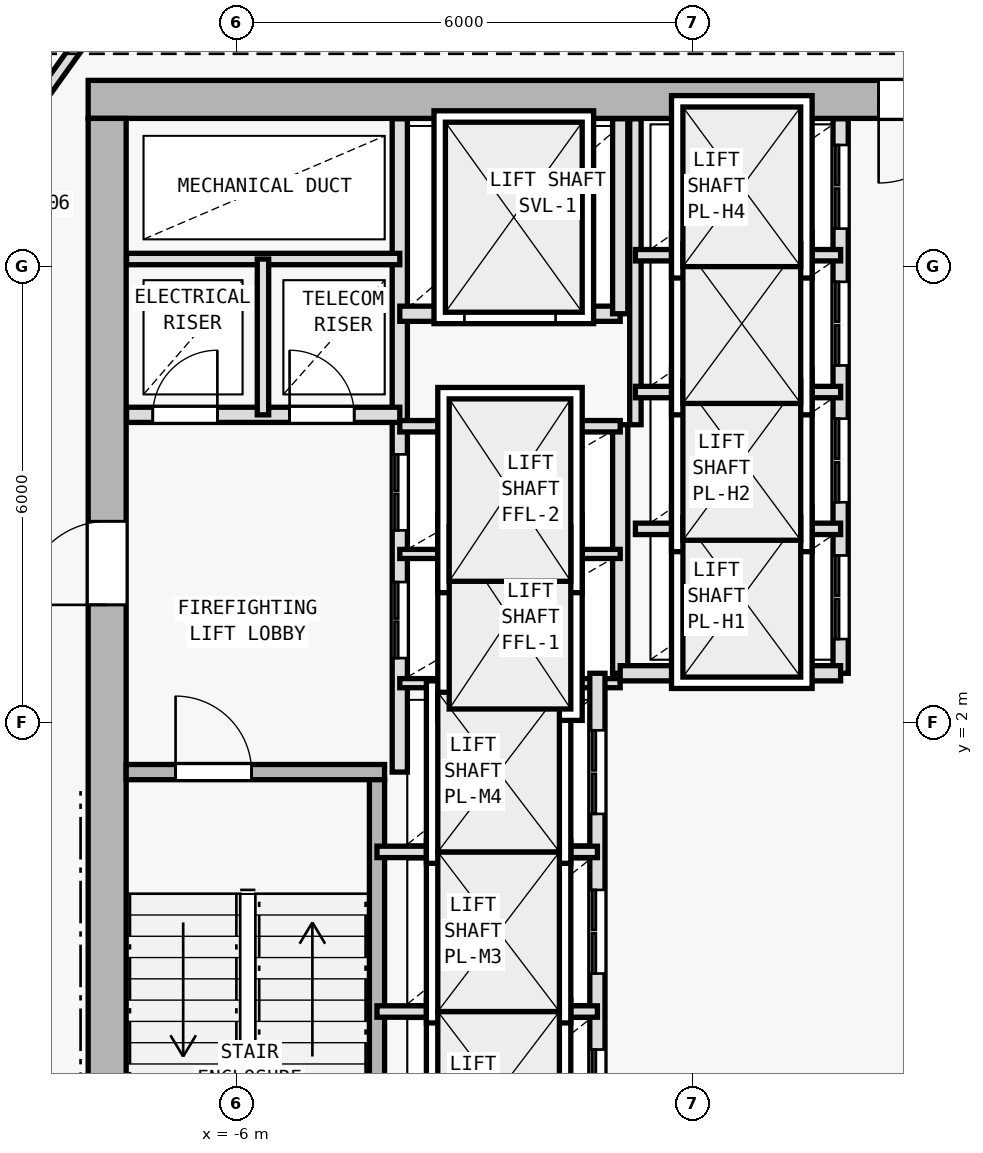
"""IFC4 building model, lengths in metres.
Left out: names, types, materials, properties, quantities, classifications, styles, units other than length and angle.
Written with IfcOpenShell. Run it as: python <this file> out.ifc"""

import sys

from ifc_helpers import new_model, si_unit, direction, frame, frame_2d, origin, origin_2d, place, context, subcontext, project, spatial, rectangle, i_section, extrude, element, fill, save


model = new_model("IFC4")
c1 = context("Model", 3, precision=1e-05, world=origin(), true_north=direction((0.0, 1.0)))
c2 = subcontext(c1, "Body", "Model", "MODEL_VIEW")
j1 = project(units=[si_unit("LENGTHUNIT", "METRE"), si_unit("PLANEANGLEUNIT", "RADIAN")], contexts=[c1])
p1 = place(None, origin())
s1 = spatial("IfcSite", under=j1, at=p1, CompositionType="ELEMENT")
p2 = place(p1, origin())
s2 = spatial("IfcBuilding", under=s1, at=p2, CompositionType="ELEMENT")
p3 = place(p2, frame((0.0, 0.0, 201.9)))
s3 = spatial("IfcBuildingStorey", under=s2, at=p3, CompositionType="ELEMENT", Elevation=201.9)
for number, where, z_axis, x_axis in (
    (1, (-7.7, 10.2, 0.0), (0.0, 0.0, 1.0), (1.0, 0.0, 0.0)),
    (2, (-7.7, 2.0, 0.0), (0.0, 0.0, 1.0), (1.0, 0.0, 0.0)),
):
    element("IfcColumn", number, at=place(p3, frame(where, z_axis=z_axis, x_axis=x_axis)), inside=s3, PredefinedType="COLUMN", context=c2, shape_type="SweptSolid", body=[
        extrude(i_section(OverallWidth=0.398, OverallDepth=0.387, WebThickness=0.013, FlangeThickness=0.022, FilletRadius=0.015, at=origin_2d()), origin(), (0.0, 0.0, 1.0), 3.6),
    ])
p4 = place(p3, frame((7.95, 10.2, 0.0), z_axis=(0.0, 0.0, 1.0), x_axis=(-1.0, 0.0, 0.0)))
e3 = element("IfcWall", 3, at=p4, inside=s3, PredefinedType="SHEAR", context=c2, shape_type="SweptSolid", body=[
    extrude(rectangle(XDim=15.9, YDim=0.5, at=frame_2d((7.95, 0.0))), origin(), (0.0, 0.0, 1.0), 3.35),
])
p5 = place(p4, frame((4.4, 0.0, 0.0)))
e4 = element("IfcOpeningElement", 4, at=p5, cuts=e3, PredefinedType="OPENING", context=c2, shape_type="SweptSolid", body=[
    extrude(rectangle(XDim=1.1, YDim=2.15, at=frame_2d((0.55, 1.075))), frame((0.0, 0.26, 0.0), z_axis=(0.0, -1.0, 0.0), x_axis=(1.0, 0.0, 0.0)), (0.0, 0.0, 1.0), 0.52),
])
p6 = place(p3, frame((-7.7, -9.15, 0.0), z_axis=(0.0, 0.0, 1.0), x_axis=(0.0, 1.0, 0.0)))
e5 = element("IfcWall", 5, at=p6, inside=s3, PredefinedType="SHEAR", context=c2, shape_type="SweptSolid", body=[
    extrude(rectangle(XDim=19.1, YDim=0.5, at=frame_2d((9.55, 0.0))), origin(), (0.0, 0.0, 1.0), 3.35),
])
p7 = place(p6, frame((12.7, 0.0, 0.0)))
e6 = element("IfcOpeningElement", 6, at=p7, cuts=e5, PredefinedType="OPENING", context=c2, shape_type="SweptSolid", body=[
    extrude(rectangle(XDim=1.1, YDim=2.15, at=frame_2d((0.55, 1.075))), frame((0.0, 0.26, 0.0), z_axis=(0.0, -1.0, 0.0), x_axis=(1.0, 0.0, 0.0)), (0.0, 0.0, 1.0), 0.52),
])
p8 = place(p3, frame((-7.45, 1.35, 0.0), z_axis=(0.0, 0.0, 1.0), x_axis=(1.0, 0.0, 0.0)))
e7 = element("IfcWall", 7, at=p8, inside=s3, PredefinedType="SOLIDWALL", context=c2, shape_type="SweptSolid", body=[
    extrude(rectangle(XDim=3.4, YDim=0.2, at=frame_2d((1.7, 0.0))), origin(), (0.0, 0.0, 1.0), 3.35),
])
p9 = place(p8, frame((0.65, 0.0, 0.0)))
e8 = element("IfcOpeningElement", 8, at=p9, cuts=e7, PredefinedType="OPENING", context=c2, shape_type="SweptSolid", body=[
    extrude(rectangle(XDim=1.0, YDim=2.15, at=frame_2d((0.5, 1.075))), frame((0.0, 0.11, 0.0), z_axis=(0.0, -1.0, 0.0), x_axis=(1.0, 0.0, 0.0)), (0.0, 0.0, 1.0), 0.22),
])
p10 = place(p3, frame((-4.15, -5.95, 0.0), z_axis=(0.0, 0.0, 1.0), x_axis=(0.0, 1.0, 0.0)))
e9 = element("IfcWall", 9, at=p10, inside=s3, PredefinedType="SOLIDWALL", context=c2, shape_type="SweptSolid", body=[
    extrude(rectangle(XDim=7.2, YDim=0.2, at=frame_2d((3.6, 0.0))), origin(), (0.0, 0.0, 1.0), 3.35),
])
p11 = place(p3, frame((-3.85, 1.35, 0.0), z_axis=(0.0, 0.0, 1.0), x_axis=(0.0, 1.0, 0.0)))
e10 = element("IfcWall", 10, at=p11, inside=s3, PredefinedType="SOLIDWALL", context=c2, shape_type="SweptSolid", body=[
    extrude(rectangle(XDim=8.595, YDim=0.2, at=frame_2d((4.297, 0.0))), origin(), (0.0, 0.0, 1.0), 3.35),
])
p12 = place(p11, frame((1.5, 0.0, 0.0)))
e11 = element("IfcOpeningElement", 11, at=p12, cuts=e10, PredefinedType="OPENING", context=c2, shape_type="SweptSolid", body=[
    extrude(rectangle(XDim=1.0, YDim=2.15, at=frame_2d((0.5, 1.075))), frame((0.0, 0.11, 0.0), z_axis=(0.0, -1.0, 0.0), x_axis=(1.0, 0.0, 0.0)), (0.0, 0.0, 1.0), 0.22),
])
p13 = place(p11, frame((3.18, 0.0, 0.0)))
e12 = element("IfcOpeningElement", 12, at=p13, cuts=e10, PredefinedType="OPENING", context=c2, shape_type="SweptSolid", body=[
    extrude(rectangle(XDim=1.0, YDim=2.15, at=frame_2d((0.5, 1.075))), frame((0.0, 0.11, 0.0), z_axis=(0.0, -1.0, 0.0), x_axis=(1.0, 0.0, 0.0)), (0.0, 0.0, 1.0), 0.22),
])
p14 = place(p3, frame((-7.445, 6.05, 0.0), z_axis=(0.0, 0.0, 1.0), x_axis=(1.0, 0.0, 0.0)))
e13 = element("IfcWall", 13, at=p14, inside=s3, PredefinedType="SOLIDWALL", context=c2, shape_type="SweptSolid", body=[
    extrude(rectangle(XDim=3.595, YDim=0.2, at=frame_2d((1.797, 0.0))), origin(), (0.0, 0.0, 1.0), 3.35),
])
p15 = place(p14, frame((0.345, 0.0, 0.0)))
e14 = element("IfcOpeningElement", 14, at=p15, cuts=e13, PredefinedType="OPENING", context=c2, shape_type="SweptSolid", body=[
    extrude(rectangle(XDim=0.85, YDim=2.1, at=frame_2d((0.425, 1.05))), frame((0.0, 0.11, 0.0), z_axis=(0.0, -1.0, 0.0), x_axis=(1.0, 0.0, 0.0)), (0.0, 0.0, 1.0), 0.22),
])
p16 = place(p14, frame((2.145, 0.0, 0.0)))
e15 = element("IfcOpeningElement", 15, at=p16, cuts=e13, PredefinedType="OPENING", context=c2, shape_type="SweptSolid", body=[
    extrude(rectangle(XDim=0.85, YDim=2.1, at=frame_2d((0.425, 1.05))), frame((0.0, 0.11, 0.0), z_axis=(0.0, -1.0, 0.0), x_axis=(1.0, 0.0, 0.0)), (0.0, 0.0, 1.0), 0.22),
])
p17 = place(p3, frame((-7.445, 8.1, 0.0), z_axis=(0.0, 0.0, 1.0), x_axis=(1.0, 0.0, 0.0)))
e16 = element("IfcWall", 16, at=p17, inside=s3, PredefinedType="PARTITIONING", context=c2, shape_type="SweptSolid", body=[
    extrude(rectangle(XDim=3.595, YDim=0.15, at=frame_2d((1.797, 0.0))), origin(), (0.0, 0.0, 1.0), 3.35),
])
p18 = place(p3, frame((-5.65, 6.05, 0.0), z_axis=(0.0, 0.0, 1.0), x_axis=(0.0, 1.0, 0.0)))
e17 = element("IfcWall", 17, at=p18, inside=s3, PredefinedType="PARTITIONING", context=c2, shape_type="SweptSolid", body=[
    extrude(rectangle(XDim=2.05, YDim=0.15, at=frame_2d((1.025, 0.0))), origin(), (0.0, 0.0, 1.0), 3.35),
])
p19 = place(p3, frame((-0.95, 2.65, 0.0), z_axis=(0.0, 0.0, 1.0), x_axis=(0.0, 1.0, 0.0)))
e18 = element("IfcWall", 18, at=p19, inside=s3, PredefinedType="SOLIDWALL", context=c2, shape_type="SweptSolid", body=[
    extrude(rectangle(XDim=3.27, YDim=0.2, at=frame_2d((1.635, 0.0))), origin(), (0.0, 0.0, 1.0), 3.35),
])
for number, where, z_axis, x_axis in (
    (19, (-3.85, 2.52, 0.0), (0.0, 0.0, 1.0), (1.0, 0.0, 0.0)),
    (20, (-3.85, 4.22, 0.0), (0.0, 0.0, 1.0), (1.0, 0.0, 0.0)),
):
    element("IfcWall", number, at=place(p3, frame(where, z_axis=z_axis, x_axis=x_axis)), inside=s3, PredefinedType="PARTITIONING", context=c2, shape_type="SweptSolid", body=[
        extrude(rectangle(XDim=2.9, YDim=0.12, at=frame_2d((1.45, 0.0))), origin(), (0.0, 0.0, 1.0), 3.35),
    ])
p20 = place(p3, frame((-3.85, 5.9, 0.0), z_axis=(0.0, 0.0, 1.0), x_axis=(1.0, 0.0, 0.0)))
e21 = element("IfcWall", 21, at=p20, inside=s3, PredefinedType="PARTITIONING", context=c2, shape_type="SweptSolid", body=[
    extrude(rectangle(XDim=2.9, YDim=0.15, at=frame_2d((1.45, 0.0))), origin(), (0.0, 0.0, 1.0), 3.35),
])
p21 = place(p3, frame((-3.85, 7.38, 0.0), z_axis=(0.0, 0.0, 1.0), x_axis=(1.0, 0.0, 0.0)))
e22 = element("IfcWall", 22, at=p21, inside=s3, PredefinedType="SOLIDWALL", context=c2, shape_type="SweptSolid", body=[
    extrude(rectangle(XDim=2.9, YDim=0.2, at=frame_2d((1.45, 0.0))), origin(), (0.0, 0.0, 1.0), 3.35),
])
p22 = place(p21, frame((0.85, 0.0, 0.0)))
e23 = element("IfcOpeningElement", 23, at=p22, cuts=e22, PredefinedType="OPENING", context=c2, shape_type="SweptSolid", body=[
    extrude(rectangle(XDim=1.2, YDim=2.2, at=frame_2d((0.6, 1.1))), frame((0.0, 0.11, 0.0), z_axis=(0.0, -1.0, 0.0), x_axis=(1.0, 0.0, 0.0)), (0.0, 0.0, 1.0), 0.22),
])
p23 = place(p3, frame((-0.95, 7.38, 0.0), z_axis=(0.0, 0.0, 1.0), x_axis=(0.0, 1.0, 0.0)))
e24 = element("IfcWall", 24, at=p23, inside=s3, PredefinedType="SOLIDWALL", context=c2, shape_type="SweptSolid", body=[
    extrude(rectangle(XDim=2.565, YDim=0.2, at=frame_2d((1.283, 0.0))), origin(), (0.0, 0.0, 1.0), 3.35),
])
p24 = place(p3, frame((-1.25, -6.05, 0.0), z_axis=(0.0, 0.0, 1.0), x_axis=(0.0, 1.0, 0.0)))
e25 = element("IfcWall", 25, at=p24, inside=s3, PredefinedType="SOLIDWALL", context=c2, shape_type="SweptSolid", body=[
    extrude(rectangle(XDim=8.7, YDim=0.2, at=frame_2d((4.35, 0.0))), origin(), (0.0, 0.0, 1.0), 3.35),
])
p25 = place(p24, frame((0.55, 0.0, 0.0)))
e26 = element("IfcOpeningElement", 26, at=p25, cuts=e25, PredefinedType="OPENING", context=c2, shape_type="SweptSolid", body=[
    extrude(rectangle(XDim=1.1, YDim=2.15, at=frame_2d((0.55, 1.075))), frame((0.0, 0.11, 0.0), z_axis=(0.0, -1.0, 0.0), x_axis=(1.0, 0.0, 0.0)), (0.0, 0.0, 1.0), 0.22),
])
p26 = place(p24, frame((2.65, 0.0, 0.0)))
e27 = element("IfcOpeningElement", 27, at=p26, cuts=e25, PredefinedType="OPENING", context=c2, shape_type="SweptSolid", body=[
    extrude(rectangle(XDim=1.1, YDim=2.15, at=frame_2d((0.55, 1.075))), frame((0.0, 0.11, 0.0), z_axis=(0.0, -1.0, 0.0), x_axis=(1.0, 0.0, 0.0)), (0.0, 0.0, 1.0), 0.22),
])
p27 = place(p24, frame((4.75, 0.0, 0.0)))
e28 = element("IfcOpeningElement", 28, at=p27, cuts=e25, PredefinedType="OPENING", context=c2, shape_type="SweptSolid", body=[
    extrude(rectangle(XDim=1.1, YDim=2.15, at=frame_2d((0.55, 1.075))), frame((0.0, 0.11, 0.0), z_axis=(0.0, -1.0, 0.0), x_axis=(1.0, 0.0, 0.0)), (0.0, 0.0, 1.0), 0.22),
])
p28 = place(p24, frame((6.85, 0.0, 0.0)))
e29 = element("IfcOpeningElement", 29, at=p28, cuts=e25, PredefinedType="OPENING", context=c2, shape_type="SweptSolid", body=[
    extrude(rectangle(XDim=1.1, YDim=2.15, at=frame_2d((0.55, 1.075))), frame((0.0, 0.11, 0.0), z_axis=(0.0, -1.0, 0.0), x_axis=(1.0, 0.0, 0.0)), (0.0, 0.0, 1.0), 0.22),
])
for number, where, z_axis, x_axis in (
    (30, (-4.15, -1.8, 0.0), (0.0, 0.0, 1.0), (1.0, 0.0, 0.0)),
    (31, (-4.15, 0.3, 0.0), (0.0, 0.0, 1.0), (1.0, 0.0, 0.0)),
):
    element("IfcWall", number, at=place(p3, frame(where, z_axis=z_axis, x_axis=x_axis)), inside=s3, PredefinedType="PARTITIONING", context=c2, shape_type="SweptSolid", body=[
        extrude(rectangle(XDim=2.9, YDim=0.15, at=frame_2d((1.45, 0.0))), origin(), (0.0, 0.0, 1.0), 3.35),
    ])
p29 = place(p3, frame((1.95, 2.65, 0.0), z_axis=(0.0, 0.0, 1.0), x_axis=(0.0, 1.0, 0.0)))
e32 = element("IfcWall", 32, at=p29, inside=s3, PredefinedType="SOLIDWALL", context=c2, shape_type="SweptSolid", body=[
    extrude(rectangle(XDim=7.295, YDim=0.2, at=frame_2d((3.647, 0.0))), origin(), (0.0, 0.0, 1.0), 3.35),
])
p30 = place(p29, frame((0.45, 0.0, 0.0)))
e33 = element("IfcOpeningElement", 33, at=p30, cuts=e32, PredefinedType="OPENING", context=c2, shape_type="SweptSolid", body=[
    extrude(rectangle(XDim=1.1, YDim=2.15, at=frame_2d((0.55, 1.075))), frame((0.0, 0.11, 0.0), z_axis=(0.0, -1.0, 0.0), x_axis=(1.0, 0.0, 0.0)), (0.0, 0.0, 1.0), 0.22),
])
p31 = place(p29, frame((2.25, 0.0, 0.0)))
e34 = element("IfcOpeningElement", 34, at=p31, cuts=e32, PredefinedType="OPENING", context=c2, shape_type="SweptSolid", body=[
    extrude(rectangle(XDim=1.1, YDim=2.15, at=frame_2d((0.55, 1.075))), frame((0.0, 0.11, 0.0), z_axis=(0.0, -1.0, 0.0), x_axis=(1.0, 0.0, 0.0)), (0.0, 0.0, 1.0), 0.22),
])
p32 = place(p29, frame((4.05, 0.0, 0.0)))
e35 = element("IfcOpeningElement", 35, at=p32, cuts=e32, PredefinedType="OPENING", context=c2, shape_type="SweptSolid", body=[
    extrude(rectangle(XDim=1.1, YDim=2.15, at=frame_2d((0.55, 1.075))), frame((0.0, 0.11, 0.0), z_axis=(0.0, -1.0, 0.0), x_axis=(1.0, 0.0, 0.0)), (0.0, 0.0, 1.0), 0.22),
])
p33 = place(p29, frame((5.85, 0.0, 0.0)))
e36 = element("IfcOpeningElement", 36, at=p33, cuts=e32, PredefinedType="OPENING", context=c2, shape_type="SweptSolid", body=[
    extrude(rectangle(XDim=1.1, YDim=2.15, at=frame_2d((0.55, 1.075))), frame((0.0, 0.11, 0.0), z_axis=(0.0, -1.0, 0.0), x_axis=(1.0, 0.0, 0.0)), (0.0, 0.0, 1.0), 0.22),
])
p34 = place(p3, frame((-0.95, 2.65, 0.0), z_axis=(0.0, 0.0, 1.0), x_axis=(1.0, 0.0, 0.0)))
e37 = element("IfcWall", 37, at=p34, inside=s3, PredefinedType="SOLIDWALL", context=c2, shape_type="SweptSolid", body=[
    extrude(rectangle(XDim=2.9, YDim=0.2, at=frame_2d((1.45, 0.0))), origin(), (0.0, 0.0, 1.0), 3.35),
])
p35 = place(p3, frame((-0.75, 5.92, 0.0), z_axis=(0.0, 0.0, 1.0), x_axis=(0.0, 1.0, 0.0)))
e38 = element("IfcWall", 38, at=p35, inside=s3, PredefinedType="PARTITIONING", context=c2, shape_type="SweptSolid", body=[
    extrude(rectangle(XDim=4.025, YDim=0.15, at=frame_2d((2.013, 0.0))), origin(), (0.0, 0.0, 1.0), 3.35),
])
for number, where, z_axis, x_axis in (
    (39, (-0.75, 4.55, 0.0), (0.0, 0.0, 1.0), (1.0, 0.0, 0.0)),
    (40, (-0.75, 6.35, 0.0), (0.0, 0.0, 1.0), (1.0, 0.0, 0.0)),
    (41, (-0.75, 8.15, 0.0), (0.0, 0.0, 1.0), (1.0, 0.0, 0.0)),
):
    element("IfcWall", number, at=place(p3, frame(where, z_axis=z_axis, x_axis=x_axis)), inside=s3, PredefinedType="PARTITIONING", context=c2, shape_type="SweptSolid", body=[
        extrude(rectangle(XDim=2.7, YDim=0.15, at=frame_2d((1.35, 0.0))), origin(), (0.0, 0.0, 1.0), 3.35),
    ])
p36 = place(p3, frame((-9.86, 8.426, 0.0), z_axis=(0.0, 0.0, 1.0), x_axis=(0.582449511476, 0.812866881218, 0.0)))
e42 = element("IfcWall", 42, at=p36, inside=s3, PredefinedType="PARTITIONING", context=c2, shape_type="SweptSolid", body=[
    extrude(rectangle(XDim=4.84, YDim=0.15, at=frame_2d((2.42, 0.0))), origin(), (0.0, 0.0, 1.0), 2.935),
])
p37 = place(p36, frame((1.07, 0.0, 0.0)))
e43 = element("IfcOpeningElement", 43, at=p37, cuts=e42, PredefinedType="OPENING", context=c2, shape_type="SweptSolid", body=[
    extrude(rectangle(XDim=0.9, YDim=2.1, at=frame_2d((0.45, 1.05))), frame((0.0, 0.085, 0.0), z_axis=(0.0, -1.0, 0.0), x_axis=(1.0, 0.0, 0.0)), (0.0, 0.0, 1.0), 0.17),
])
p38 = place(p7, origin())
e44 = element("IfcDoor", 44, at=p38, inside=s3, OperationType="SINGLE_SWING_LEFT", PredefinedType="DOOR", context=c2, shape_type="SweptSolid", body=[
    extrude(rectangle(XDim=1.1, YDim=2.15, at=frame_2d((0.55, 1.075))), frame((0.0, 0.025, 0.0), z_axis=(0.0, -1.0, 0.0), x_axis=(1.0, 0.0, 0.0)), (0.0, 0.0, 1.0), 0.05),
])
fill(e6, e44)
p39 = place(p5, origin())
e45 = element("IfcDoor", 45, at=p39, inside=s3, OperationType="SINGLE_SWING_RIGHT", PredefinedType="DOOR", context=c2, shape_type="SweptSolid", body=[
    extrude(rectangle(XDim=1.1, YDim=2.15, at=frame_2d((0.55, 1.075))), frame((0.0, 0.025, 0.0), z_axis=(0.0, -1.0, 0.0), x_axis=(1.0, 0.0, 0.0)), (0.0, 0.0, 1.0), 0.05),
])
fill(e4, e45)
p40 = place(p9, origin())
e46 = element("IfcDoor", 46, at=p40, inside=s3, OperationType="SINGLE_SWING_LEFT", PredefinedType="DOOR", context=c2, shape_type="SweptSolid", body=[
    extrude(rectangle(XDim=1.0, YDim=2.15, at=frame_2d((0.5, 1.075))), frame((0.0, 0.025, 0.0), z_axis=(0.0, -1.0, 0.0), x_axis=(1.0, 0.0, 0.0)), (0.0, 0.0, 1.0), 0.05),
])
fill(e8, e46)
p41 = place(p15, origin())
e47 = element("IfcDoor", 47, at=p41, inside=s3, OperationType="SINGLE_SWING_RIGHT", PredefinedType="DOOR", context=c2, shape_type="SweptSolid", body=[
    extrude(rectangle(XDim=0.85, YDim=2.1, at=frame_2d((0.425, 1.05))), frame((0.0, 0.025, 0.0), z_axis=(0.0, -1.0, 0.0), x_axis=(1.0, 0.0, 0.0)), (0.0, 0.0, 1.0), 0.05),
])
fill(e14, e47)
p42 = place(p16, origin())
e48 = element("IfcDoor", 48, at=p42, inside=s3, OperationType="SINGLE_SWING_LEFT", PredefinedType="DOOR", context=c2, shape_type="SweptSolid", body=[
    extrude(rectangle(XDim=0.85, YDim=2.1, at=frame_2d((0.425, 1.05))), frame((0.0, 0.025, 0.0), z_axis=(0.0, -1.0, 0.0), x_axis=(1.0, 0.0, 0.0)), (0.0, 0.0, 1.0), 0.05),
])
fill(e15, e48)
p43 = place(p22, origin())
e49 = element("IfcDoor", 49, at=p43, inside=s3, OperationType="DOUBLE_DOOR_SLIDING", PredefinedType="DOOR", context=c2, shape_type="SweptSolid", body=[
    extrude(rectangle(XDim=1.2, YDim=2.2, at=frame_2d((0.6, 1.1))), frame((0.0, 0.025, 0.0), z_axis=(0.0, -1.0, 0.0), x_axis=(1.0, 0.0, 0.0)), (0.0, 0.0, 1.0), 0.05),
])
fill(e23, e49)
p44 = place(p26, origin())
e50 = element("IfcDoor", 50, at=p44, inside=s3, OperationType="DOUBLE_DOOR_SLIDING", PredefinedType="DOOR", context=c2, shape_type="SweptSolid", body=[
    extrude(rectangle(XDim=1.1, YDim=2.15, at=frame_2d((0.55, 1.075))), frame((0.0, 0.025, 0.0), z_axis=(0.0, -1.0, 0.0), x_axis=(1.0, 0.0, 0.0)), (0.0, 0.0, 1.0), 0.05),
])
fill(e27, e50)
p45 = place(p27, origin())
e51 = element("IfcDoor", 51, at=p45, inside=s3, OperationType="DOUBLE_DOOR_SLIDING", PredefinedType="DOOR", context=c2, shape_type="SweptSolid", body=[
    extrude(rectangle(XDim=1.1, YDim=2.15, at=frame_2d((0.55, 1.075))), frame((0.0, 0.025, 0.0), z_axis=(0.0, -1.0, 0.0), x_axis=(1.0, 0.0, 0.0)), (0.0, 0.0, 1.0), 0.05),
])
fill(e28, e51)
p46 = place(p28, origin())
e52 = element("IfcDoor", 52, at=p46, inside=s3, OperationType="DOUBLE_DOOR_SLIDING", PredefinedType="DOOR", context=c2, shape_type="SweptSolid", body=[
    extrude(rectangle(XDim=1.1, YDim=2.15, at=frame_2d((0.55, 1.075))), frame((0.0, 0.025, 0.0), z_axis=(0.0, -1.0, 0.0), x_axis=(1.0, 0.0, 0.0)), (0.0, 0.0, 1.0), 0.05),
])
fill(e29, e52)
p47 = place(p30, origin())
e53 = element("IfcDoor", 53, at=p47, inside=s3, OperationType="DOUBLE_DOOR_SLIDING", PredefinedType="DOOR", context=c2, shape_type="SweptSolid", body=[
    extrude(rectangle(XDim=1.1, YDim=2.15, at=frame_2d((0.55, 1.075))), frame((0.0, 0.025, 0.0), z_axis=(0.0, -1.0, 0.0), x_axis=(1.0, 0.0, 0.0)), (0.0, 0.0, 1.0), 0.05),
])
fill(e33, e53)
p48 = place(p31, origin())
e54 = element("IfcDoor", 54, at=p48, inside=s3, OperationType="DOUBLE_DOOR_SLIDING", PredefinedType="DOOR", context=c2, shape_type="SweptSolid", body=[
    extrude(rectangle(XDim=1.1, YDim=2.15, at=frame_2d((0.55, 1.075))), frame((0.0, 0.025, 0.0), z_axis=(0.0, -1.0, 0.0), x_axis=(1.0, 0.0, 0.0)), (0.0, 0.0, 1.0), 0.05),
])
fill(e34, e54)
p49 = place(p32, origin())
e55 = element("IfcDoor", 55, at=p49, inside=s3, OperationType="DOUBLE_DOOR_SLIDING", PredefinedType="DOOR", context=c2, shape_type="SweptSolid", body=[
    extrude(rectangle(XDim=1.1, YDim=2.15, at=frame_2d((0.55, 1.075))), frame((0.0, 0.025, 0.0), z_axis=(0.0, -1.0, 0.0), x_axis=(1.0, 0.0, 0.0)), (0.0, 0.0, 1.0), 0.05),
])
fill(e35, e55)
p50 = place(p33, origin())
e56 = element("IfcDoor", 56, at=p50, inside=s3, OperationType="DOUBLE_DOOR_SLIDING", PredefinedType="DOOR", context=c2, shape_type="SweptSolid", body=[
    extrude(rectangle(XDim=1.1, YDim=2.15, at=frame_2d((0.55, 1.075))), frame((0.0, 0.025, 0.0), z_axis=(0.0, -1.0, 0.0), x_axis=(1.0, 0.0, 0.0)), (0.0, 0.0, 1.0), 0.05),
])
fill(e36, e56)
p51 = place(p12, origin())
e57 = element("IfcDoor", 57, at=p51, inside=s3, OperationType="DOUBLE_DOOR_SLIDING", PredefinedType="DOOR", context=c2, shape_type="SweptSolid", body=[
    extrude(rectangle(XDim=1.0, YDim=2.15, at=frame_2d((0.5, 1.075))), frame((0.0, 0.025, 0.0), z_axis=(0.0, -1.0, 0.0), x_axis=(1.0, 0.0, 0.0)), (0.0, 0.0, 1.0), 0.05),
])
fill(e11, e57)
p52 = place(p13, origin())
e58 = element("IfcDoor", 58, at=p52, inside=s3, OperationType="DOUBLE_DOOR_SLIDING", PredefinedType="DOOR", context=c2, shape_type="SweptSolid", body=[
    extrude(rectangle(XDim=1.0, YDim=2.15, at=frame_2d((0.5, 1.075))), frame((0.0, 0.025, 0.0), z_axis=(0.0, -1.0, 0.0), x_axis=(1.0, 0.0, 0.0)), (0.0, 0.0, 1.0), 0.05),
])
fill(e12, e58)
save(model, sys.argv[1])
